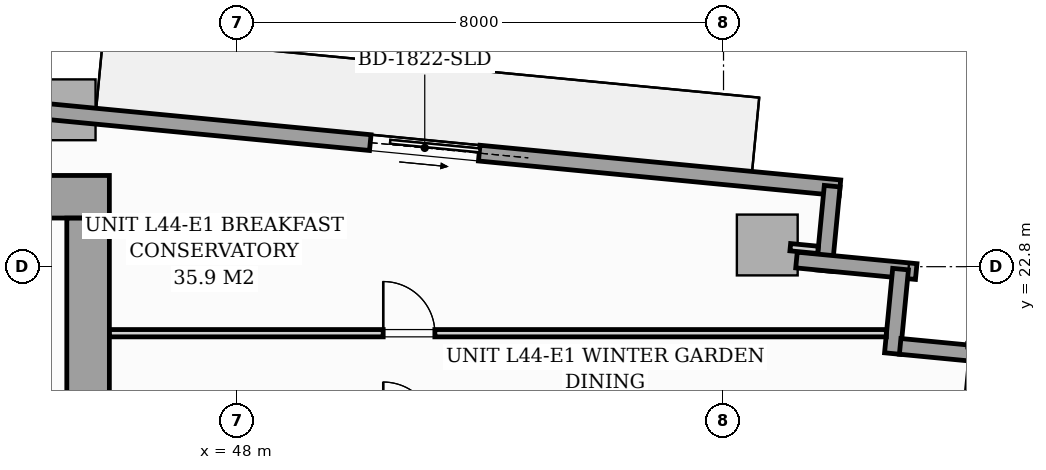
"""IFC4 building model, lengths in metres.
Left out: names, types, materials, properties, quantities, classifications, styles, units other than length and angle.
Written with IfcOpenShell. Run it as: python <this file> out.ifc"""

import sys

from ifc_helpers import new_model, si_unit, direction, frame, frame_2d, origin, origin_2d, place, context, subcontext, project, spatial, rectangle, i_section, extrude, source, transform, mapped, element, fill, save


model = new_model("IFC4")
c1 = context("Model", 3, precision=1e-05, world=origin(), true_north=direction((0.0, 1.0)))
c2 = subcontext(c1, "Body", "Model", "MODEL_VIEW")
j1 = project(units=[si_unit("LENGTHUNIT", "METRE"), si_unit("PLANEANGLEUNIT", "RADIAN")], contexts=[c1])
p1 = place(None, origin())
s1 = spatial("IfcSite", under=j1, at=p1, CompositionType="ELEMENT")
p2 = place(p1, origin())
s2 = spatial("IfcBuilding", under=s1, at=p2, CompositionType="ELEMENT")
p3 = place(p2, frame((0.0, 0.0, 153.4)))
s3 = spatial("IfcBuildingStorey", under=s2, at=p3, CompositionType="ELEMENT", Elevation=153.4)
m1 = source(origin(), c2, "Body", "SweptSolid", [
    extrude(i_section(OverallWidth=0.421, OverallDepth=0.465, WebThickness=0.045, FlangeThickness=0.073, FilletRadius=0.018, at=origin_2d()), origin(), (0.0, 0.0, 1.0), 3.196),
])
p4 = place(p3, frame((45.6, 24.0, 0.002), z_axis=(0.0, 0.0, 1.0), x_axis=(1.0, 0.0, 0.0)))
e1 = element("IfcColumn", 1, at=p4, inside=s3, PredefinedType="PILASTER", context=c2, shape_type="MappedRepresentation", body=[
    mapped(m1, transform((0.0, 0.0, 0.0), scale=1.0)),
])
m2 = source(origin(), c2, "Body", "SweptSolid", [
    extrude(rectangle(XDim=1.0, YDim=1.0, at=origin_2d()), origin(), (0.0, 0.0, 1.0), 3.196),
])
for number, where, z_axis, x_axis in (
    (2, (45.173, 25.38, 0.002), (0.0, 0.0, 1.0), (0.995, -0.096, 0.0)),
    (3, (56.719, 23.157, 0.002), (0.0, 0.0, 1.0), (0.995, -0.096, 0.0)),
):
    element("IfcColumn", number, at=place(p3, frame(where, z_axis=z_axis, x_axis=x_axis)), inside=s3, PredefinedType="COLUMN", context=c2, shape_type="MappedRepresentation", body=[
        mapped(m2, transform((0.0, 0.0, 0.0), scale=1.0)),
    ])
p5 = place(p3, frame((40.983, 25.727, 0.0), z_axis=(0.0, 0.0, 1.0), x_axis=(0.995395844771, -0.095849424686, 0.0)))
e4 = element("IfcWall", 4, at=p5, inside=s3, PredefinedType="STANDARD", context=c2, shape_type="SweptSolid", body=[
    extrude(rectangle(XDim=17.01, YDim=0.26, at=frame_2d((8.505, 0.0))), origin(), (0.0, 0.0, 1.0), 2.94),
])
p6 = place(p5, frame((9.25, 0.0, 0.0)))
e5 = element("IfcOpeningElement", 5, at=p6, cuts=e4, PredefinedType="OPENING", context=c2, shape_type="SweptSolid", body=[
    extrude(rectangle(XDim=1.8, YDim=2.06, at=frame_2d((0.9, 1.03))), frame((0.0, 0.14, 0.0), z_axis=(0.0, -1.0, 0.0), x_axis=(1.0, 0.0, 0.0)), (0.0, 0.0, 1.0), 0.28),
])
p7 = place(p5, frame((0.7, 0.0, 0.65)))
e6 = element("IfcOpeningElement", 6, at=p7, cuts=e4, PredefinedType="OPENING", context=c2, shape_type="SweptSolid", body=[
    extrude(rectangle(XDim=1.6, YDim=1.5, at=frame_2d((0.8, 0.75))), frame((0.0, 0.14, 0.0), z_axis=(0.0, -1.0, 0.0), x_axis=(1.0, 0.0, 0.0)), (0.0, 0.0, 1.0), 0.28),
])
p8 = place(p3, frame((57.787, 24.124, 0.0), z_axis=(0.0, 0.0, 1.0), x_axis=(-0.095915846097, -0.995389446633, 0.0)))
e7 = element("IfcWall", 7, at=p8, inside=s3, PredefinedType="STANDARD", context=c2, shape_type="SweptSolid", body=[
    extrude(rectangle(XDim=1.395, YDim=0.26, at=frame_2d((0.697, 0.0))), origin(), (0.0, 0.0, 1.0), 2.94),
])
p9 = place(p3, frame((57.2, 22.909, 0.0), z_axis=(0.0, 0.0, 1.0), x_axis=(0.995401789159, -0.095787672171, 0.0)))
e8 = element("IfcWall", 8, at=p9, inside=s3, PredefinedType="STANDARD", context=c2, shape_type="SweptSolid", body=[
    extrude(rectangle(XDim=1.978, YDim=0.26, at=frame_2d((0.989, 0.0))), origin(), (0.0, 0.0, 1.0), 2.94),
])
for number, where, z_axis, x_axis in (
    (9, (58.912, 22.76, 0.0), (0.0, 0.0, 1.0), (-0.096, -0.995, 0.0)),
    (10, (58.905, 21.49, 0.0), (0.0, 0.0, 1.0), (0.995, -0.096, 0.0)),
):
    element("IfcWall", number, at=place(p3, frame(where, z_axis=z_axis, x_axis=x_axis)), inside=s3, PredefinedType="STANDARD", context=c2, shape_type="SweptSolid", body=[
        extrude(rectangle(XDim=1.395, YDim=0.26, at=frame_2d((0.698, 0.0))), origin(), (0.0, 0.0, 1.0), 2.94),
    ])
p10 = place(p3, frame((26.1, 23.95, 0.0), z_axis=(0.0, 0.0, 1.0), x_axis=(1.0, 0.0, 0.0)))
e11 = element("IfcWall", 11, at=p10, inside=s3, PredefinedType="SHEAR", context=c2, shape_type="SweptSolid", body=[
    extrude(rectangle(XDim=19.8, YDim=0.7, at=frame_2d((9.9, 0.0))), origin(), (0.0, 0.0, 1.0), 3.2),
])
p11 = place(p3, frame((45.55, 17.802, 0.0), z_axis=(0.0, 0.0, 1.0), x_axis=(0.0, 1.0, 0.0)))
e12 = element("IfcWall", 12, at=p11, inside=s3, PredefinedType="SHEAR", context=c2, shape_type="SweptSolid", body=[
    extrude(rectangle(XDim=5.796, YDim=0.7, at=frame_2d((2.898, 0.0))), origin(), (0.0, 0.0, 1.0), 3.2),
])
p12 = place(p3, frame((45.902, 21.706, 0.0), z_axis=(0.0, 0.0, 1.0), x_axis=(1.0, 0.0, 0.0)))
e13 = element("IfcWall", 13, at=p12, inside=s3, PredefinedType="PARTITIONING", context=c2, shape_type="SweptSolid", body=[
    extrude(rectangle(XDim=12.775, YDim=0.12, at=frame_2d((6.388, 0.0))), origin(), (0.0, 0.0, 1.0), 2.94),
])
p13 = place(p12, frame((4.501, 0.0, 0.0)))
e14 = element("IfcOpeningElement", 14, at=p13, cuts=e13, PredefinedType="OPENING", context=c2, shape_type="SweptSolid", body=[
    extrude(rectangle(XDim=0.85, YDim=2.05, at=frame_2d((0.425, 1.025))), frame((0.0, 0.07, 0.0), z_axis=(0.0, -1.0, 0.0), x_axis=(1.0, 0.0, 0.0)), (0.0, 0.0, 1.0), 0.14),
])
p14 = place(p3, frame((57.098, 23.12, 0.0), z_axis=(0.0, 0.0, 1.0), x_axis=(0.995384576284, -0.09596637586, 0.0)))
e15 = element("IfcWall", 15, at=p14, inside=s3, PredefinedType="PARTITIONING", context=c2, shape_type="SweptSolid", body=[
    extrude(rectangle(XDim=0.458, YDim=0.12, at=frame_2d((0.229, 0.0))), origin(), (0.0, 0.0, 1.0), 2.94),
])
m3 = source(origin(), c2, "Body", "SweptSolid", [
    extrude(rectangle(XDim=1.8, YDim=2.06, at=frame_2d((0.9, 1.03))), frame((0.0, 0.025, 0.0), z_axis=(0.0, -1.0, 0.0), x_axis=(1.0, 0.0, 0.0)), (0.0, 0.0, 1.0), 0.05),
])
p15 = place(p6, origin())
e16 = element("IfcDoor", 16, at=p15, inside=s3, OperationType="SLIDING_TO_RIGHT", PredefinedType="DOOR", context=c2, shape_type="MappedRepresentation", body=[
    mapped(m3, transform((0.0, 0.0, 0.0), scale=1.0)),
])
fill(e5, e16)
m4 = source(origin(), c2, "Body", "SweptSolid", [
    extrude(rectangle(XDim=0.85, YDim=2.05, at=frame_2d((0.425, 1.025))), frame((0.0, 0.025, 0.0), z_axis=(0.0, -1.0, 0.0), x_axis=(1.0, 0.0, 0.0)), (0.0, 0.0, 1.0), 0.05),
])
p16 = place(p13, origin())
e17 = element("IfcDoor", 17, at=p16, inside=s3, OperationType="SINGLE_SWING_LEFT", PredefinedType="DOOR", context=c2, shape_type="MappedRepresentation", body=[
    mapped(m4, transform((0.0, 0.0, 0.0), scale=1.0)),
])
fill(e14, e17)
save(model, sys.argv[1])
